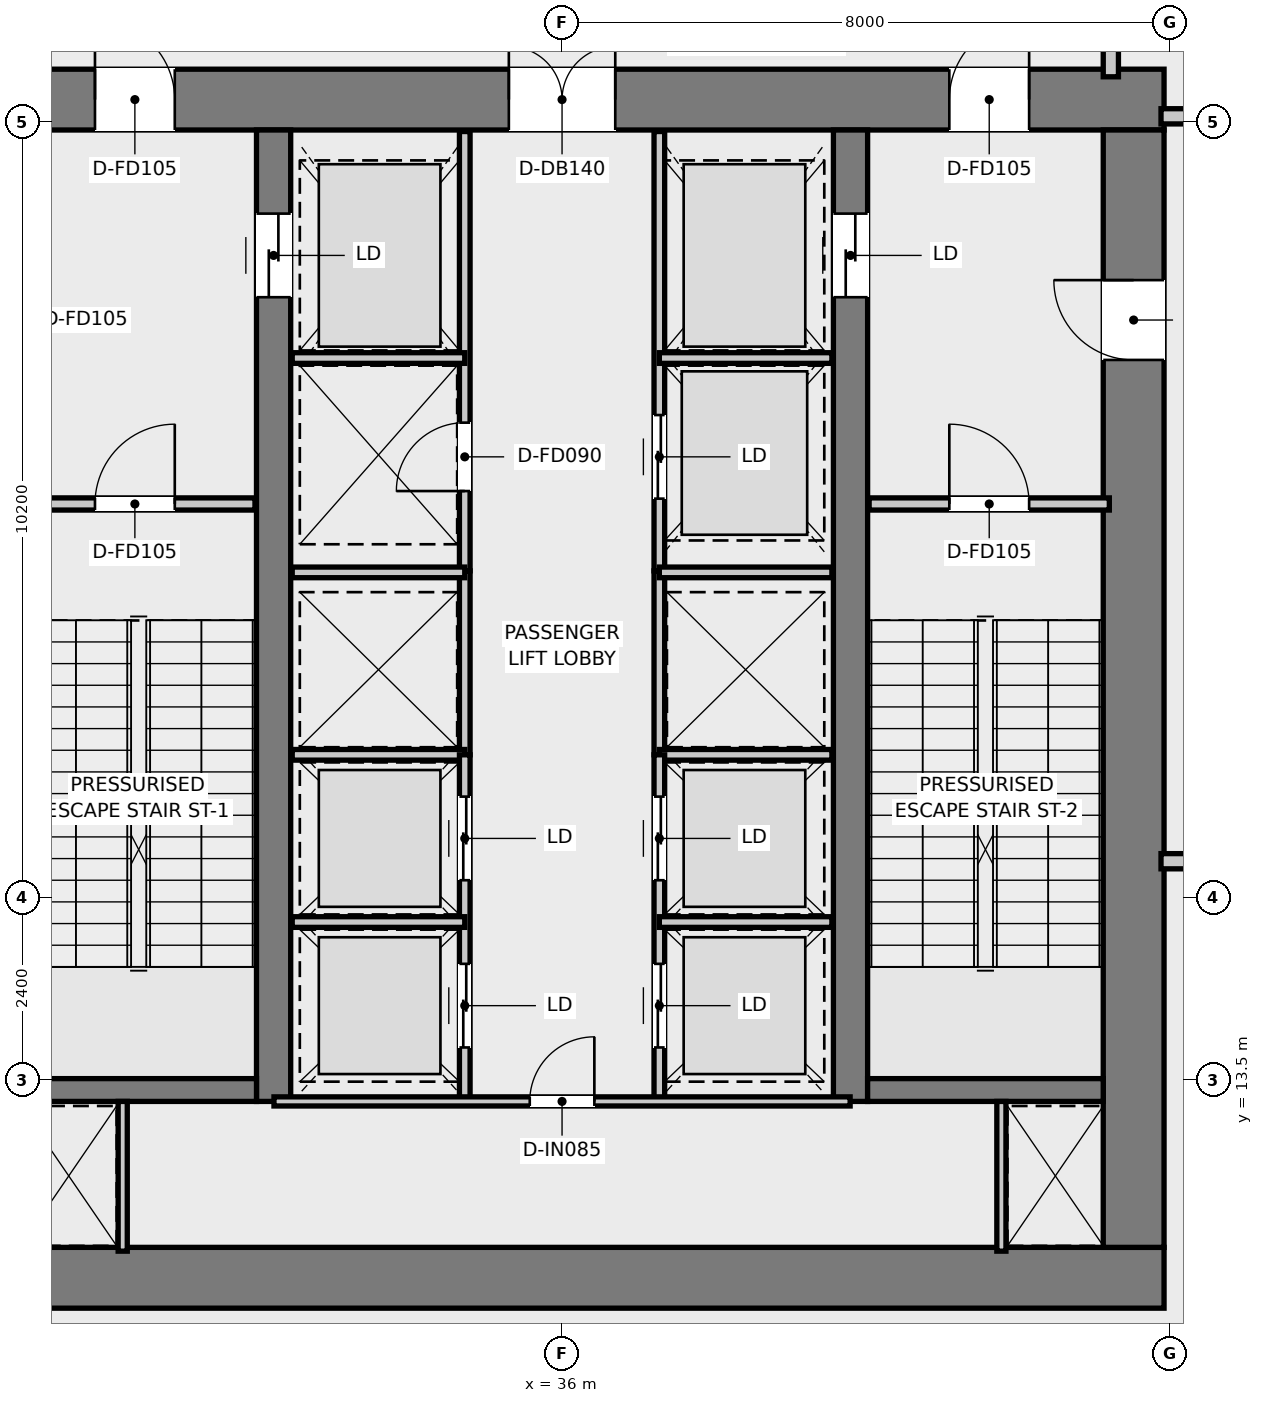
"""IFC4 building model, lengths in metres.
Left out: names, types, materials, properties, quantities, classifications, styles, units other than length and angle.
Written with IfcOpenShell. Run it as: python <this file> out.ifc"""

import sys

from ifc_helpers import new_model, si_unit, direction, frame, frame_2d, origin, place, context, subcontext, project, spatial, rectangle, extrude, element, fill, save


model = new_model("IFC4")
c1 = context("Model", 3, precision=1e-05, world=origin(), true_north=direction((0.0, 1.0)))
c2 = subcontext(c1, "Body", "Model", "MODEL_VIEW")
j1 = project(units=[si_unit("LENGTHUNIT", "METRE"), si_unit("PLANEANGLEUNIT", "RADIAN")], contexts=[c1])
p1 = place(None, origin())
s1 = spatial("IfcSite", under=j1, at=p1, CompositionType="ELEMENT")
p2 = place(p1, origin())
s2 = spatial("IfcBuilding", under=s1, at=p2, CompositionType="ELEMENT")
p3 = place(p2, frame((0.0, 0.0, 80.3)))
s3 = spatial("IfcBuildingStorey", under=s2, at=p3, CompositionType="ELEMENT", Elevation=80.3)
p4 = place(p3, frame((28.08, 10.9, 0.0), z_axis=(0.0, 0.0, 1.0), x_axis=(1.0, 0.0, 0.0)))
e1 = element("IfcWall", 1, at=p4, inside=s3, PredefinedType="SHEAR", context=c2, shape_type="SweptSolid", body=[
    extrude(rectangle(XDim=15.84, YDim=0.8, at=frame_2d((7.92, 0.0))), origin(), (0.0, 0.0, 1.0), 5.8),
])
p5 = place(p3, frame((28.08, 26.4, 0.0), z_axis=(0.0, 0.0, 1.0), x_axis=(1.0, 0.0, 0.0)))
e2 = element("IfcWall", 2, at=p5, inside=s3, PredefinedType="SHEAR", context=c2, shape_type="SweptSolid", body=[
    extrude(rectangle(XDim=15.84, YDim=0.8, at=frame_2d((7.92, 0.0))), origin(), (0.0, 0.0, 1.0), 5.8),
])
p6 = place(p5, frame((7.22, 0.0, 0.0)))
e3 = element("IfcOpeningElement", 3, at=p6, cuts=e2, PredefinedType="OPENING", context=c2, shape_type="SweptSolid", body=[
    extrude(rectangle(XDim=1.4, YDim=2.2, at=frame_2d((0.7, 1.1))), frame((0.0, 0.41, 0.0), z_axis=(0.0, -1.0, 0.0), x_axis=(1.0, 0.0, 0.0)), (0.0, 0.0, 1.0), 0.82),
])
p7 = place(p5, frame((1.775, 0.0, 0.0)))
e4 = element("IfcOpeningElement", 4, at=p7, cuts=e2, PredefinedType="OPENING", context=c2, shape_type="SweptSolid", body=[
    extrude(rectangle(XDim=1.05, YDim=2.1, at=frame_2d((0.525, 1.05))), frame((0.0, 0.41, 0.0), z_axis=(0.0, -1.0, 0.0), x_axis=(1.0, 0.0, 0.0)), (0.0, 0.0, 1.0), 0.82),
])
p8 = place(p5, frame((13.015, 0.0, 0.0)))
e5 = element("IfcOpeningElement", 5, at=p8, cuts=e2, PredefinedType="OPENING", context=c2, shape_type="SweptSolid", body=[
    extrude(rectangle(XDim=1.05, YDim=2.1, at=frame_2d((0.525, 1.05))), frame((0.0, 0.41, 0.0), z_axis=(0.0, -1.0, 0.0), x_axis=(1.0, 0.0, 0.0)), (0.0, 0.0, 1.0), 0.82),
])
p9 = place(p3, frame((43.52, 11.3, 0.0), z_axis=(0.0, 0.0, 1.0), x_axis=(0.0, 1.0, 0.0)))
e6 = element("IfcWall", 6, at=p9, inside=s3, PredefinedType="SHEAR", context=c2, shape_type="SweptSolid", body=[
    extrude(rectangle(XDim=14.7, YDim=0.8, at=frame_2d((7.35, 0.0))), origin(), (0.0, 0.0, 1.0), 5.8),
])
p10 = place(p9, frame((11.675, 0.0, 0.0)))
e7 = element("IfcOpeningElement", 7, at=p10, cuts=e6, PredefinedType="OPENING", context=c2, shape_type="SweptSolid", body=[
    extrude(rectangle(XDim=1.05, YDim=2.1, at=frame_2d((0.525, 1.05))), frame((0.0, 0.41, 0.0), z_axis=(0.0, -1.0, 0.0), x_axis=(1.0, 0.0, 0.0)), (0.0, 0.0, 1.0), 0.82),
])
p11 = place(p3, frame((32.205, 13.22, 0.0), z_axis=(0.0, 0.0, 1.0), x_axis=(0.0, 1.0, 0.0)))
e8 = element("IfcWall", 8, at=p11, inside=s3, PredefinedType="SHEAR", context=c2, shape_type="SweptSolid", body=[
    extrude(rectangle(XDim=12.78, YDim=0.45, at=frame_2d((6.39, 0.0))), origin(), (0.0, 0.0, 1.0), 5.8),
])
p12 = place(p11, frame((10.58, 0.0, 0.0)))
e9 = element("IfcOpeningElement", 9, at=p12, cuts=e8, PredefinedType="OPENING", context=c2, shape_type="SweptSolid", body=[
    extrude(rectangle(XDim=1.1, YDim=2.15, at=frame_2d((0.55, 1.075))), frame((0.0, 0.235, 0.0), z_axis=(0.0, -1.0, 0.0), x_axis=(1.0, 0.0, 0.0)), (0.0, 0.0, 1.0), 0.47),
])
p13 = place(p3, frame((39.795, 13.22, 0.0), z_axis=(0.0, 0.0, 1.0), x_axis=(0.0, 1.0, 0.0)))
e10 = element("IfcWall", 10, at=p13, inside=s3, PredefinedType="SHEAR", context=c2, shape_type="SweptSolid", body=[
    extrude(rectangle(XDim=12.78, YDim=0.45, at=frame_2d((6.39, 0.0))), origin(), (0.0, 0.0, 1.0), 5.8),
])
p14 = place(p13, frame((10.58, 0.0, 0.0)))
e11 = element("IfcOpeningElement", 11, at=p14, cuts=e10, PredefinedType="OPENING", context=c2, shape_type="SweptSolid", body=[
    extrude(rectangle(XDim=1.1, YDim=2.15, at=frame_2d((0.55, 1.075))), frame((0.0, 0.235, 0.0), z_axis=(0.0, -1.0, 0.0), x_axis=(1.0, 0.0, 0.0)), (0.0, 0.0, 1.0), 0.47),
])
for number, where, z_axis, x_axis in (
    (12, (28.88, 13.37, 0.0), (0.0, 0.0, 1.0), (1.0, 0.0, 0.0)),
    (13, (40.02, 13.37, 0.0), (0.0, 0.0, 1.0), (1.0, 0.0, 0.0)),
):
    element("IfcWall", number, at=place(p3, frame(where, z_axis=z_axis, x_axis=x_axis)), inside=s3, PredefinedType="SHEAR", context=c2, shape_type="SweptSolid", body=[
        extrude(rectangle(XDim=3.1, YDim=0.3, at=frame_2d((1.55, 0.0))), origin(), (0.0, 0.0, 1.0), 5.8),
    ])
p15 = place(p3, frame((28.8, 21.08, 0.0), z_axis=(0.0, 0.0, 1.0), x_axis=(1.0, 0.0, 0.0)))
e14 = element("IfcWall", 14, at=p15, inside=s3, PredefinedType="PARTITIONING", context=c2, shape_type="SweptSolid", body=[
    extrude(rectangle(XDim=3.16, YDim=0.16, at=frame_2d((1.58, 0.0))), origin(), (0.0, 0.0, 1.0), 5.52),
])
p16 = place(p15, frame((1.055, 0.0, 0.0)))
e15 = element("IfcOpeningElement", 15, at=p16, cuts=e14, PredefinedType="OPENING", context=c2, shape_type="SweptSolid", body=[
    extrude(rectangle(XDim=1.05, YDim=2.1, at=frame_2d((0.525, 1.05))), frame((0.0, 0.09, 0.0), z_axis=(0.0, -1.0, 0.0), x_axis=(1.0, 0.0, 0.0)), (0.0, 0.0, 1.0), 0.18),
])
p17 = place(p3, frame((40.04, 21.08, 0.0), z_axis=(0.0, 0.0, 1.0), x_axis=(1.0, 0.0, 0.0)))
e16 = element("IfcWall", 16, at=p17, inside=s3, PredefinedType="PARTITIONING", context=c2, shape_type="SweptSolid", body=[
    extrude(rectangle(XDim=3.16, YDim=0.16, at=frame_2d((1.58, 0.0))), origin(), (0.0, 0.0, 1.0), 5.52),
])
p18 = place(p17, frame((1.055, 0.0, 0.0)))
e17 = element("IfcOpeningElement", 17, at=p18, cuts=e16, PredefinedType="OPENING", context=c2, shape_type="SweptSolid", body=[
    extrude(rectangle(XDim=1.05, YDim=2.1, at=frame_2d((0.525, 1.05))), frame((0.0, 0.09, 0.0), z_axis=(0.0, -1.0, 0.0), x_axis=(1.0, 0.0, 0.0)), (0.0, 0.0, 1.0), 0.18),
])
p19 = place(p3, frame((34.72, 20.2, 0.0), z_axis=(0.0, 0.0, 1.0), x_axis=(0.0, 1.0, 0.0)))
e18 = element("IfcWall", 18, at=p19, inside=s3, PredefinedType="PARTITIONING", context=c2, shape_type="SweptSolid", body=[
    extrude(rectangle(XDim=5.78, YDim=0.14, at=frame_2d((2.89, 0.0))), origin(), (0.0, 0.0, 1.0), 4.32),
])
p20 = place(p19, frame((1.05, 0.0, 0.0)))
e19 = element("IfcOpeningElement", 19, at=p20, cuts=e18, PredefinedType="OPENING", context=c2, shape_type="SweptSolid", body=[
    extrude(rectangle(XDim=0.9, YDim=2.1, at=frame_2d((0.45, 1.05))), frame((0.0, 0.08, 0.0), z_axis=(0.0, -1.0, 0.0), x_axis=(1.0, 0.0, 0.0)), (0.0, 0.0, 1.0), 0.16),
])
p21 = place(p3, frame((37.28, 20.2, 0.0), z_axis=(0.0, 0.0, 1.0), x_axis=(0.0, 1.0, 0.0)))
e20 = element("IfcWall", 20, at=p21, inside=s3, PredefinedType="PARTITIONING", context=c2, shape_type="SweptSolid", body=[
    extrude(rectangle(XDim=5.78, YDim=0.14, at=frame_2d((2.89, 0.0))), origin(), (0.0, 0.0, 1.0), 4.32),
])
p22 = place(p21, frame((0.95, 0.0, 0.0)))
e21 = element("IfcOpeningElement", 21, at=p22, cuts=e20, PredefinedType="OPENING", context=c2, shape_type="SweptSolid", body=[
    extrude(rectangle(XDim=1.1, YDim=2.15, at=frame_2d((0.55, 1.075))), frame((0.0, 0.08, 0.0), z_axis=(0.0, -1.0, 0.0), x_axis=(1.0, 0.0, 0.0)), (0.0, 0.0, 1.0), 0.16),
])
for number, where, z_axis, x_axis in (
    (22, (32.45, 23.0, 0.0), (0.0, 0.0, 1.0), (1.0, 0.0, 0.0)),
    (23, (37.28, 23.0, 0.0), (0.0, 0.0, 1.0), (1.0, 0.0, 0.0)),
):
    element("IfcWall", number, at=place(p3, frame(where, z_axis=z_axis, x_axis=x_axis)), inside=s3, PredefinedType="PARTITIONING", context=c2, shape_type="SweptSolid", body=[
        extrude(rectangle(XDim=2.27, YDim=0.14, at=frame_2d((1.135, 0.0))), origin(), (0.0, 0.0, 1.0), 4.32),
    ])
for number, where, z_axis, x_axis in (
    (24, (34.72, 17.78, 0.0), (0.0, 0.0, 1.0), (0.0, 1.0, 0.0)),
    (25, (37.28, 17.78, 0.0), (0.0, 0.0, 1.0), (0.0, 1.0, 0.0)),
):
    element("IfcWall", number, at=place(p3, frame(where, z_axis=z_axis, x_axis=x_axis)), inside=s3, PredefinedType="PARTITIONING", context=c2, shape_type="SweptSolid", body=[
        extrude(rectangle(XDim=2.42, YDim=0.14, at=frame_2d((1.21, 0.0))), origin(), (0.0, 0.0, 1.0), 5.52),
    ])
for number, where, z_axis, x_axis in (
    (26, (32.45, 17.78, 0.0), (0.0, 0.0, 1.0), (1.0, 0.0, 0.0)),
    (27, (32.45, 20.18, 0.0), (0.0, 0.0, 1.0), (1.0, 0.0, 0.0)),
    (28, (37.28, 17.78, 0.0), (0.0, 0.0, 1.0), (1.0, 0.0, 0.0)),
    (29, (37.28, 20.18, 0.0), (0.0, 0.0, 1.0), (1.0, 0.0, 0.0)),
):
    element("IfcWall", number, at=place(p3, frame(where, z_axis=z_axis, x_axis=x_axis)), inside=s3, PredefinedType="PARTITIONING", context=c2, shape_type="SweptSolid", body=[
        extrude(rectangle(XDim=2.27, YDim=0.14, at=frame_2d((1.135, 0.0))), origin(), (0.0, 0.0, 1.0), 5.52),
    ])
p23 = place(p3, frame((34.72, 13.22, 0.0), z_axis=(0.0, 0.0, 1.0), x_axis=(0.0, 1.0, 0.0)))
e30 = element("IfcWall", 30, at=p23, inside=s3, PredefinedType="PARTITIONING", context=c2, shape_type="SweptSolid", body=[
    extrude(rectangle(XDim=4.56, YDim=0.14, at=frame_2d((2.28, 0.0))), origin(), (0.0, 0.0, 1.0), 5.52),
])
p24 = place(p23, frame((0.71, 0.0, 0.0)))
e31 = element("IfcOpeningElement", 31, at=p24, cuts=e30, PredefinedType="OPENING", context=c2, shape_type="SweptSolid", body=[
    extrude(rectangle(XDim=1.1, YDim=2.15, at=frame_2d((0.55, 1.075))), frame((0.0, 0.08, 0.0), z_axis=(0.0, -1.0, 0.0), x_axis=(1.0, 0.0, 0.0)), (0.0, 0.0, 1.0), 0.16),
])
p25 = place(p23, frame((2.91, 0.0, 0.0)))
e32 = element("IfcOpeningElement", 32, at=p25, cuts=e30, PredefinedType="OPENING", context=c2, shape_type="SweptSolid", body=[
    extrude(rectangle(XDim=1.1, YDim=2.15, at=frame_2d((0.55, 1.075))), frame((0.0, 0.08, 0.0), z_axis=(0.0, -1.0, 0.0), x_axis=(1.0, 0.0, 0.0)), (0.0, 0.0, 1.0), 0.16),
])
p26 = place(p3, frame((32.45, 15.58, 0.0), z_axis=(0.0, 0.0, 1.0), x_axis=(1.0, 0.0, 0.0)))
e33 = element("IfcWall", 33, at=p26, inside=s3, PredefinedType="PARTITIONING", context=c2, shape_type="SweptSolid", body=[
    extrude(rectangle(XDim=2.27, YDim=0.14, at=frame_2d((1.135, 0.0))), origin(), (0.0, 0.0, 1.0), 5.52),
])
p27 = place(p3, frame((37.28, 13.22, 0.0), z_axis=(0.0, 0.0, 1.0), x_axis=(0.0, 1.0, 0.0)))
e34 = element("IfcWall", 34, at=p27, inside=s3, PredefinedType="PARTITIONING", context=c2, shape_type="SweptSolid", body=[
    extrude(rectangle(XDim=4.56, YDim=0.14, at=frame_2d((2.28, 0.0))), origin(), (0.0, 0.0, 1.0), 5.52),
])
p28 = place(p27, frame((0.71, 0.0, 0.0)))
e35 = element("IfcOpeningElement", 35, at=p28, cuts=e34, PredefinedType="OPENING", context=c2, shape_type="SweptSolid", body=[
    extrude(rectangle(XDim=1.1, YDim=2.15, at=frame_2d((0.55, 1.075))), frame((0.0, 0.08, 0.0), z_axis=(0.0, -1.0, 0.0), x_axis=(1.0, 0.0, 0.0)), (0.0, 0.0, 1.0), 0.16),
])
p29 = place(p27, frame((2.91, 0.0, 0.0)))
e36 = element("IfcOpeningElement", 36, at=p29, cuts=e34, PredefinedType="OPENING", context=c2, shape_type="SweptSolid", body=[
    extrude(rectangle(XDim=1.1, YDim=2.15, at=frame_2d((0.55, 1.075))), frame((0.0, 0.08, 0.0), z_axis=(0.0, -1.0, 0.0), x_axis=(1.0, 0.0, 0.0)), (0.0, 0.0, 1.0), 0.16),
])
p30 = place(p3, frame((37.28, 15.58, 0.0), z_axis=(0.0, 0.0, 1.0), x_axis=(1.0, 0.0, 0.0)))
e37 = element("IfcWall", 37, at=p30, inside=s3, PredefinedType="PARTITIONING", context=c2, shape_type="SweptSolid", body=[
    extrude(rectangle(XDim=2.27, YDim=0.14, at=frame_2d((1.135, 0.0))), origin(), (0.0, 0.0, 1.0), 5.52),
])
for number, where, z_axis, x_axis in (
    (38, (30.22, 11.25, 0.0), (0.0, 0.0, 1.0), (0.0, 1.0, 0.0)),
    (39, (41.78, 11.25, 0.0), (0.0, 0.0, 1.0), (0.0, 1.0, 0.0)),
):
    element("IfcWall", number, at=place(p3, frame(where, z_axis=z_axis, x_axis=x_axis)), inside=s3, PredefinedType="PARTITIONING", context=c2, shape_type="SweptSolid", body=[
        extrude(rectangle(XDim=1.97, YDim=0.12, at=frame_2d((0.985, 0.0))), origin(), (0.0, 0.0, 1.0), 5.52),
    ])
p31 = place(p3, frame((32.21, 13.22, 0.0), z_axis=(0.0, 0.0, 1.0), x_axis=(1.0, 0.0, 0.0)))
e40 = element("IfcWall", 40, at=p31, inside=s3, PredefinedType="PARTITIONING", context=c2, shape_type="SweptSolid", body=[
    extrude(rectangle(XDim=7.58, YDim=0.12, at=frame_2d((3.79, 0.0))), origin(), (0.0, 0.0, 1.0), 5.52),
])
p32 = place(p31, frame((3.365, 0.0, 0.0)))
e41 = element("IfcOpeningElement", 41, at=p32, cuts=e40, PredefinedType="OPENING", context=c2, shape_type="SweptSolid", body=[
    extrude(rectangle(XDim=0.85, YDim=2.1, at=frame_2d((0.425, 1.05))), frame((0.0, 0.07, 0.0), z_axis=(0.0, -1.0, 0.0), x_axis=(1.0, 0.0, 0.0)), (0.0, 0.0, 1.0), 0.14),
])
p33 = place(p3, frame((43.22, 26.7, 0.0), z_axis=(0.0, 0.0, 1.0), x_axis=(0.0, 1.0, 0.0)))
e42 = element("IfcWall", 42, at=p33, inside=s3, PredefinedType="SOLIDWALL", context=c2, shape_type="SweptSolid", body=[
    extrude(rectangle(XDim=12.6, YDim=0.2, at=frame_2d((6.3, 0.0))), origin(), (0.0, 0.0, 1.0), 4.82),
])
p34 = place(p3, frame((43.88, 16.38, 0.0), z_axis=(0.0, 0.0, 1.0), x_axis=(1.0, 0.0, 0.0)))
e43 = element("IfcWall", 43, at=p34, inside=s3, PredefinedType="SOLIDWALL", context=c2, shape_type="SweptSolid", body=[
    extrude(rectangle(XDim=6.07, YDim=0.2, at=frame_2d((3.035, 0.0))), origin(), (0.0, 0.0, 1.0), 4.82),
])
p35 = place(p3, frame((43.88, 26.18, 0.0), z_axis=(0.0, 0.0, 1.0), x_axis=(1.0, 0.0, 0.0)))
e44 = element("IfcWall", 44, at=p35, inside=s3, PredefinedType="SOLIDWALL", context=c2, shape_type="SweptSolid", body=[
    extrude(rectangle(XDim=3.54, YDim=0.2, at=frame_2d((1.77, 0.0))), origin(), (0.0, 0.0, 1.0), 4.82),
])
p36 = place(p16, origin())
e45 = element("IfcDoor", 45, at=p36, inside=s3, OperationType="SINGLE_SWING_RIGHT", PredefinedType="DOOR", context=c2, shape_type="SweptSolid", body=[
    extrude(rectangle(XDim=1.05, YDim=2.1, at=frame_2d((0.525, 1.05))), frame((0.0, 0.025, 0.0), z_axis=(0.0, -1.0, 0.0), x_axis=(1.0, 0.0, 0.0)), (0.0, 0.0, 1.0), 0.05),
])
fill(e15, e45)
p37 = place(p18, origin())
e46 = element("IfcDoor", 46, at=p37, inside=s3, OperationType="SINGLE_SWING_LEFT", PredefinedType="DOOR", context=c2, shape_type="SweptSolid", body=[
    extrude(rectangle(XDim=1.05, YDim=2.1, at=frame_2d((0.525, 1.05))), frame((0.0, 0.025, 0.0), z_axis=(0.0, -1.0, 0.0), x_axis=(1.0, 0.0, 0.0)), (0.0, 0.0, 1.0), 0.05),
])
fill(e17, e46)
p38 = place(p6, origin())
e47 = element("IfcDoor", 47, at=p38, inside=s3, OperationType="DOUBLE_DOOR_SINGLE_SWING", PredefinedType="DOOR", context=c2, shape_type="SweptSolid", body=[
    extrude(rectangle(XDim=1.4, YDim=2.2, at=frame_2d((0.7, 1.1))), frame((0.0, 0.025, 0.0), z_axis=(0.0, -1.0, 0.0), x_axis=(1.0, 0.0, 0.0)), (0.0, 0.0, 1.0), 0.05),
])
fill(e3, e47)
p39 = place(p7, origin())
e48 = element("IfcDoor", 48, at=p39, inside=s3, OperationType="SINGLE_SWING_LEFT", PredefinedType="DOOR", context=c2, shape_type="SweptSolid", body=[
    extrude(rectangle(XDim=1.05, YDim=2.1, at=frame_2d((0.525, 1.05))), frame((0.0, 0.025, 0.0), z_axis=(0.0, -1.0, 0.0), x_axis=(1.0, 0.0, 0.0)), (0.0, 0.0, 1.0), 0.05),
])
fill(e4, e48)
p40 = place(p8, origin())
e49 = element("IfcDoor", 49, at=p40, inside=s3, OperationType="SINGLE_SWING_RIGHT", PredefinedType="DOOR", context=c2, shape_type="SweptSolid", body=[
    extrude(rectangle(XDim=1.05, YDim=2.1, at=frame_2d((0.525, 1.05))), frame((0.0, 0.025, 0.0), z_axis=(0.0, -1.0, 0.0), x_axis=(1.0, 0.0, 0.0)), (0.0, 0.0, 1.0), 0.05),
])
fill(e5, e49)
p41 = place(p10, origin())
e50 = element("IfcDoor", 50, at=p41, inside=s3, OperationType="SINGLE_SWING_RIGHT", PredefinedType="DOOR", context=c2, shape_type="SweptSolid", body=[
    extrude(rectangle(XDim=1.05, YDim=2.1, at=frame_2d((0.525, 1.05))), frame((0.0, 0.025, 0.0), z_axis=(0.0, -1.0, 0.0), x_axis=(1.0, 0.0, 0.0)), (0.0, 0.0, 1.0), 0.05),
])
fill(e7, e50)
p42 = place(p12, origin())
e51 = element("IfcDoor", 51, at=p42, inside=s3, OperationType="DOUBLE_DOOR_SLIDING", PredefinedType="DOOR", context=c2, shape_type="SweptSolid", body=[
    extrude(rectangle(XDim=1.1, YDim=2.15, at=frame_2d((0.55, 1.075))), frame((0.0, 0.025, 0.0), z_axis=(0.0, -1.0, 0.0), x_axis=(1.0, 0.0, 0.0)), (0.0, 0.0, 1.0), 0.05),
])
fill(e9, e51)
p43 = place(p14, origin())
e52 = element("IfcDoor", 52, at=p43, inside=s3, OperationType="DOUBLE_DOOR_SLIDING", PredefinedType="DOOR", context=c2, shape_type="SweptSolid", body=[
    extrude(rectangle(XDim=1.1, YDim=2.15, at=frame_2d((0.55, 1.075))), frame((0.0, 0.025, 0.0), z_axis=(0.0, -1.0, 0.0), x_axis=(1.0, 0.0, 0.0)), (0.0, 0.0, 1.0), 0.05),
])
fill(e11, e52)
p44 = place(p20, origin())
e53 = element("IfcDoor", 53, at=p44, inside=s3, OperationType="SINGLE_SWING_LEFT", PredefinedType="DOOR", context=c2, shape_type="SweptSolid", body=[
    extrude(rectangle(XDim=0.9, YDim=2.1, at=frame_2d((0.45, 1.05))), frame((0.0, 0.025, 0.0), z_axis=(0.0, -1.0, 0.0), x_axis=(1.0, 0.0, 0.0)), (0.0, 0.0, 1.0), 0.05),
])
fill(e19, e53)
p45 = place(p22, origin())
e54 = element("IfcDoor", 54, at=p45, inside=s3, OperationType="DOUBLE_DOOR_SLIDING", PredefinedType="DOOR", context=c2, shape_type="SweptSolid", body=[
    extrude(rectangle(XDim=1.1, YDim=2.15, at=frame_2d((0.55, 1.075))), frame((0.0, 0.025, 0.0), z_axis=(0.0, -1.0, 0.0), x_axis=(1.0, 0.0, 0.0)), (0.0, 0.0, 1.0), 0.05),
])
fill(e21, e54)
p46 = place(p24, origin())
e55 = element("IfcDoor", 55, at=p46, inside=s3, OperationType="DOUBLE_DOOR_SLIDING", PredefinedType="DOOR", context=c2, shape_type="SweptSolid", body=[
    extrude(rectangle(XDim=1.1, YDim=2.15, at=frame_2d((0.55, 1.075))), frame((0.0, 0.025, 0.0), z_axis=(0.0, -1.0, 0.0), x_axis=(1.0, 0.0, 0.0)), (0.0, 0.0, 1.0), 0.05),
])
fill(e31, e55)
p47 = place(p25, origin())
e56 = element("IfcDoor", 56, at=p47, inside=s3, OperationType="DOUBLE_DOOR_SLIDING", PredefinedType="DOOR", context=c2, shape_type="SweptSolid", body=[
    extrude(rectangle(XDim=1.1, YDim=2.15, at=frame_2d((0.55, 1.075))), frame((0.0, 0.025, 0.0), z_axis=(0.0, -1.0, 0.0), x_axis=(1.0, 0.0, 0.0)), (0.0, 0.0, 1.0), 0.05),
])
fill(e32, e56)
p48 = place(p28, origin())
e57 = element("IfcDoor", 57, at=p48, inside=s3, OperationType="DOUBLE_DOOR_SLIDING", PredefinedType="DOOR", context=c2, shape_type="SweptSolid", body=[
    extrude(rectangle(XDim=1.1, YDim=2.15, at=frame_2d((0.55, 1.075))), frame((0.0, 0.025, 0.0), z_axis=(0.0, -1.0, 0.0), x_axis=(1.0, 0.0, 0.0)), (0.0, 0.0, 1.0), 0.05),
])
fill(e35, e57)
p49 = place(p29, origin())
e58 = element("IfcDoor", 58, at=p49, inside=s3, OperationType="DOUBLE_DOOR_SLIDING", PredefinedType="DOOR", context=c2, shape_type="SweptSolid", body=[
    extrude(rectangle(XDim=1.1, YDim=2.15, at=frame_2d((0.55, 1.075))), frame((0.0, 0.025, 0.0), z_axis=(0.0, -1.0, 0.0), x_axis=(1.0, 0.0, 0.0)), (0.0, 0.0, 1.0), 0.05),
])
fill(e36, e58)
p50 = place(p32, origin())
e59 = element("IfcDoor", 59, at=p50, inside=s3, OperationType="SINGLE_SWING_RIGHT", PredefinedType="DOOR", context=c2, shape_type="SweptSolid", body=[
    extrude(rectangle(XDim=0.85, YDim=2.1, at=frame_2d((0.425, 1.05))), frame((0.0, 0.025, 0.0), z_axis=(0.0, -1.0, 0.0), x_axis=(1.0, 0.0, 0.0)), (0.0, 0.0, 1.0), 0.05),
])
fill(e41, e59)
save(model, sys.argv[1])
